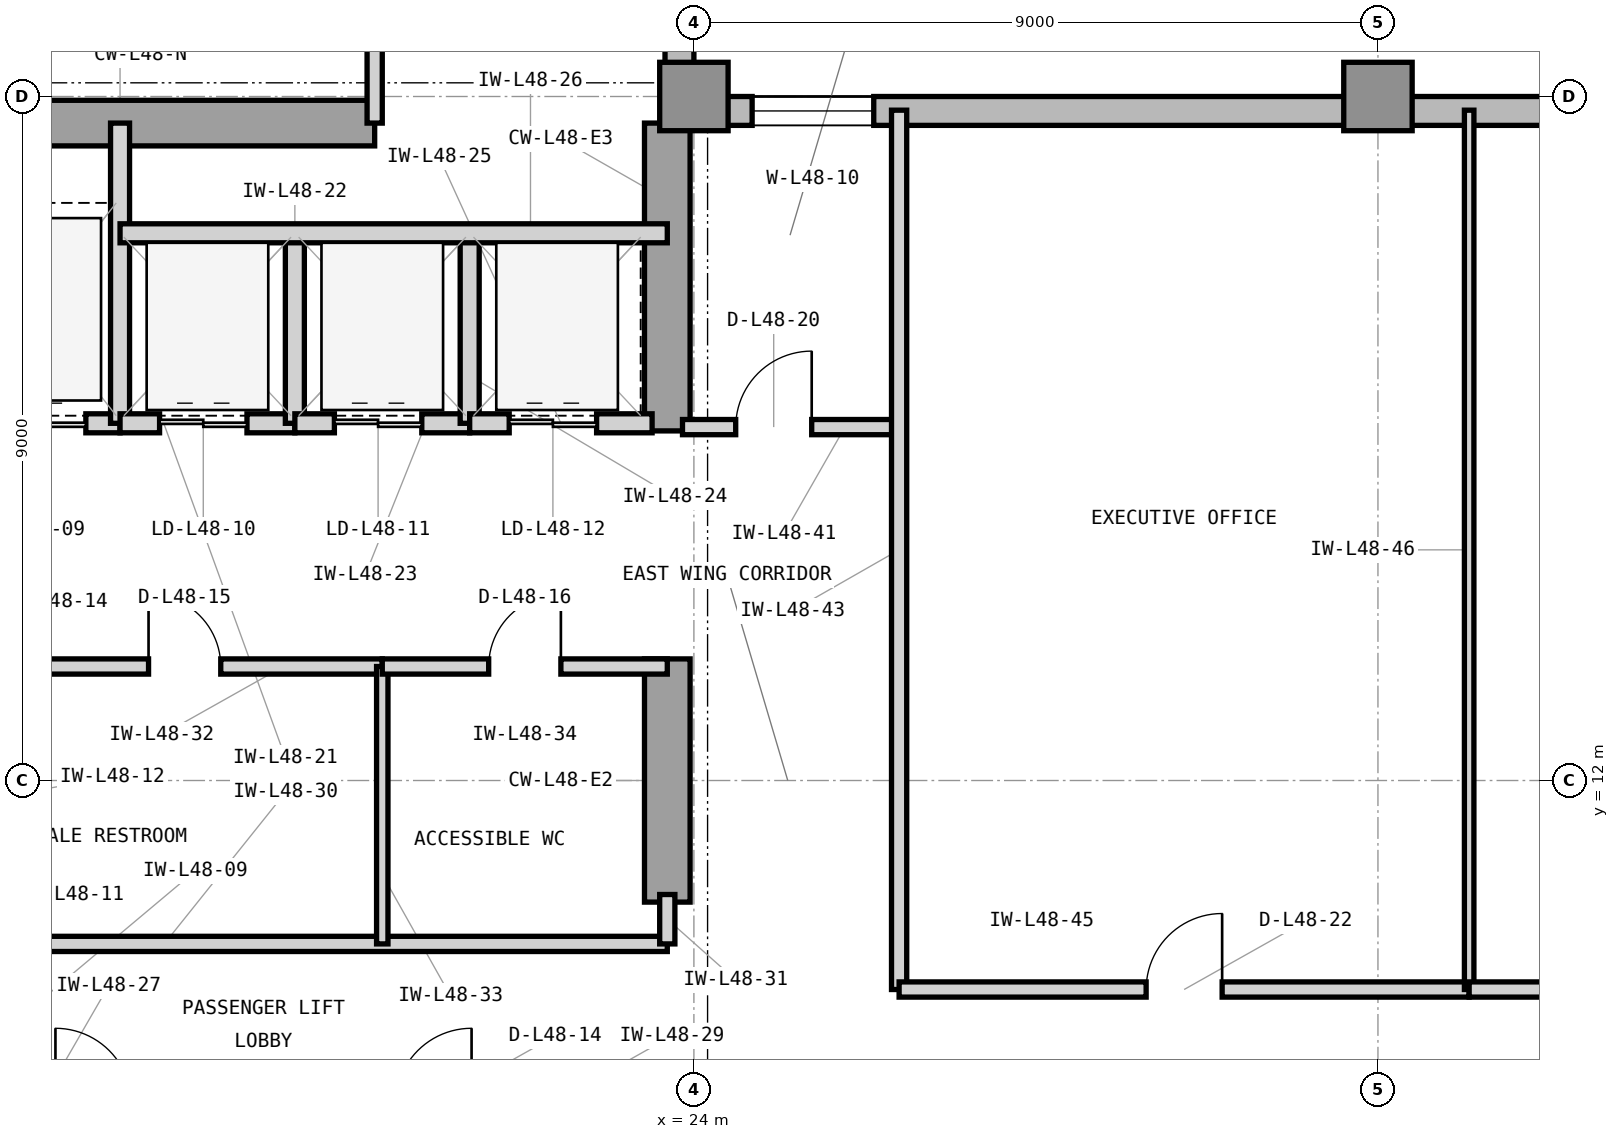
"""IFC4 building model, lengths in metres.
Left out: names, types, materials, properties, quantities, classifications, styles, units other than length and angle.
Written with IfcOpenShell. Run it as: python <this file> out.ifc"""

import sys

from ifc_helpers import new_model, si_unit, direction, frame, frame_2d, origin, origin_2d, place, context, subcontext, project, spatial, rectangle, extrude, element, fill, save


model = new_model("IFC4")
c1 = context("Model", 3, precision=1e-05, world=origin(), true_north=direction((0.0, 1.0)))
c2 = subcontext(c1, "Body", "Model", "MODEL_VIEW")
j1 = project(units=[si_unit("LENGTHUNIT", "METRE"), si_unit("PLANEANGLEUNIT", "RADIAN")], contexts=[c1])
p1 = place(None, origin())
s1 = spatial("IfcSite", under=j1, at=p1, CompositionType="ELEMENT")
p2 = place(p1, origin())
s2 = spatial("IfcBuilding", under=s1, at=p2, CompositionType="ELEMENT")
p3 = place(p2, frame((0.0, 0.0, 199.5)))
s3 = spatial("IfcBuildingStorey", under=s2, at=p3, CompositionType="ELEMENT", Elevation=199.5)
p4 = place(p3, frame((7.475, 20.65, 0.0), z_axis=(0.0, 0.0, 1.0), x_axis=(1.0, 0.0, 0.0)))
e1 = element("IfcWall", 1, at=p4, inside=s3, PredefinedType="SHEAR", context=c2, shape_type="SweptSolid", body=[
    extrude(rectangle(XDim=12.325, YDim=0.6, at=frame_2d((6.163, 0.0))), origin(), (0.0, 0.0, 1.0), 3.9),
])
p5 = place(p3, frame((23.65, 10.4, 0.0), z_axis=(0.0, 0.0, 1.0), x_axis=(0.0, 1.0, 0.0)))
e2 = element("IfcWall", 2, at=p5, inside=s3, PredefinedType="SHEAR", context=c2, shape_type="SweptSolid", body=[
    extrude(rectangle(XDim=3.2, YDim=0.6, at=frame_2d((1.6, 0.0))), origin(), (0.0, 0.0, 1.0), 3.9),
])
p6 = place(p3, frame((23.65, 16.6, 0.0), z_axis=(0.0, 0.0, 1.0), x_axis=(0.0, 1.0, 0.0)))
e3 = element("IfcWall", 3, at=p6, inside=s3, PredefinedType="SHEAR", context=c2, shape_type="SweptSolid", body=[
    extrude(rectangle(XDim=4.05, YDim=0.6, at=frame_2d((2.025, 0.0))), origin(), (0.0, 0.0, 1.0), 3.9),
])
for number, where, z_axis, x_axis in (
    (4, (24.0, 21.0, 0.0), (0.0, 0.0, 1.0), (1.0, 0.0, 0.0)),
    (5, (33.0, 21.0, 0.0), (0.0, 0.0, 1.0), (1.0, 0.0, 0.0)),
):
    element("IfcColumn", number, at=place(p3, frame(where, z_axis=z_axis, x_axis=x_axis)), inside=s3, PredefinedType="COLUMN", context=c2, shape_type="SweptSolid", body=[
        extrude(rectangle(XDim=0.9, YDim=0.9, at=origin_2d()), origin(), (0.0, 0.0, 1.0), 3.9),
    ])
p7 = place(p3, frame((55.4, 20.81, 0.0), z_axis=(0.0, 0.0, 1.0), x_axis=(-1.0, 0.0, 0.0)))
e6 = element("IfcWall", 6, at=p7, inside=s3, PredefinedType="STANDARD", context=c2, shape_type="SweptSolid", body=[
    extrude(rectangle(XDim=31.4, YDim=0.38, at=frame_2d((15.7, 0.0))), origin(), (0.0, 0.0, 1.0), 3.7),
])
p8 = place(p7, frame((17.167, 0.0, 0.9)))
e7 = element("IfcOpeningElement", 7, at=p8, cuts=e6, PredefinedType="OPENING", context=c2, shape_type="SweptSolid", body=[
    extrude(rectangle(XDim=2.3, YDim=2.2, at=frame_2d((1.15, 1.1))), frame((0.0, 0.2, 0.0), z_axis=(0.0, -1.0, 0.0), x_axis=(1.0, 0.0, 0.0)), (0.0, 0.0, 1.0), 0.4),
])
p9 = place(p7, frame((29.034, 0.0, 0.9)))
e8 = element("IfcOpeningElement", 8, at=p9, cuts=e6, PredefinedType="OPENING", context=c2, shape_type="SweptSolid", body=[
    extrude(rectangle(XDim=1.6, YDim=2.2, at=frame_2d((0.8, 1.1))), frame((0.0, 0.2, 0.0), z_axis=(0.0, -1.0, 0.0), x_axis=(1.0, 0.0, 0.0)), (0.0, 0.0, 1.0), 0.4),
])
p10 = place(p7, frame((8.904, 0.0, 0.9)))
e9 = element("IfcOpeningElement", 9, at=p10, cuts=e6, PredefinedType="OPENING", context=c2, shape_type="SweptSolid", body=[
    extrude(rectangle(XDim=2.3, YDim=2.2, at=frame_2d((1.15, 1.1))), frame((0.0, 0.2, 0.0), z_axis=(0.0, -1.0, 0.0), x_axis=(1.0, 0.0, 0.0)), (0.0, 0.0, 1.0), 0.4),
])
p11 = place(p3, frame((23.81, 21.0, 0.0), z_axis=(0.0, 0.0, 1.0), x_axis=(0.0, 1.0, 0.0)))
e10 = element("IfcWall", 10, at=p11, inside=s3, PredefinedType="STANDARD", context=c2, shape_type="SweptSolid", body=[
    extrude(rectangle(XDim=8.55, YDim=0.38, at=frame_2d((4.275, 0.0))), origin(), (0.0, 0.0, 1.0), 3.7),
])
p12 = place(p3, frame((14.15, 16.7, 0.0), z_axis=(0.0, 0.0, 1.0), x_axis=(1.0, 0.0, 0.0)))
e11 = element("IfcWall", 11, at=p12, inside=s3, PredefinedType="PARTITIONING", context=c2, shape_type="SweptSolid", body=[
    extrude(rectangle(XDim=2.3, YDim=0.25, at=frame_2d((1.15, 0.0))), origin(), (0.0, 0.0, 1.0), 3.283),
])
p13 = place(p12, frame((0.45, 0.0, 0.0)))
e12 = element("IfcOpeningElement", 12, at=p13, cuts=e11, PredefinedType="OPENING", context=c2, shape_type="SweptSolid", body=[
    extrude(rectangle(XDim=1.4, YDim=2.35, at=frame_2d((0.7, 1.175))), frame((0.0, 0.135, 0.0), z_axis=(0.0, -1.0, 0.0), x_axis=(1.0, 0.0, 0.0)), (0.0, 0.0, 1.0), 0.27),
])
p14 = place(p3, frame((16.45, 16.7, 0.0), z_axis=(0.0, 0.0, 1.0), x_axis=(0.0, 1.0, 0.0)))
e13 = element("IfcWall", 13, at=p14, inside=s3, PredefinedType="PARTITIONING", context=c2, shape_type="SweptSolid", body=[
    extrude(rectangle(XDim=3.95, YDim=0.25, at=frame_2d((1.975, 0.0))), origin(), (0.0, 0.0, 1.0), 3.69),
])
p15 = place(p3, frame((16.45, 16.7, 0.0), z_axis=(0.0, 0.0, 1.0), x_axis=(1.0, 0.0, 0.0)))
e14 = element("IfcWall", 14, at=p15, inside=s3, PredefinedType="PARTITIONING", context=c2, shape_type="SweptSolid", body=[
    extrude(rectangle(XDim=2.3, YDim=0.25, at=frame_2d((1.15, 0.0))), origin(), (0.0, 0.0, 1.0), 3.283),
])
p16 = place(p15, frame((0.52, 0.0, 0.0)))
e15 = element("IfcOpeningElement", 15, at=p16, cuts=e14, PredefinedType="OPENING", context=c2, shape_type="SweptSolid", body=[
    extrude(rectangle(XDim=1.15, YDim=2.25, at=frame_2d((0.575, 1.125))), frame((0.0, 0.135, 0.0), z_axis=(0.0, -1.0, 0.0), x_axis=(1.0, 0.0, 0.0)), (0.0, 0.0, 1.0), 0.27),
])
p17 = place(p3, frame((18.75, 16.7, 0.0), z_axis=(0.0, 0.0, 1.0), x_axis=(0.0, 1.0, 0.0)))
e16 = element("IfcWall", 16, at=p17, inside=s3, PredefinedType="PARTITIONING", context=c2, shape_type="SweptSolid", body=[
    extrude(rectangle(XDim=2.5, YDim=0.25, at=frame_2d((1.25, 0.0))), origin(), (0.0, 0.0, 1.0), 3.69),
])
p18 = place(p3, frame((18.75, 16.7, 0.0), z_axis=(0.0, 0.0, 1.0), x_axis=(1.0, 0.0, 0.0)))
e17 = element("IfcWall", 17, at=p18, inside=s3, PredefinedType="PARTITIONING", context=c2, shape_type="SweptSolid", body=[
    extrude(rectangle(XDim=2.3, YDim=0.25, at=frame_2d((1.15, 0.0))), origin(), (0.0, 0.0, 1.0), 3.283),
])
p19 = place(p18, frame((0.52, 0.0, 0.0)))
e18 = element("IfcOpeningElement", 18, at=p19, cuts=e17, PredefinedType="OPENING", context=c2, shape_type="SweptSolid", body=[
    extrude(rectangle(XDim=1.15, YDim=2.25, at=frame_2d((0.575, 1.125))), frame((0.0, 0.135, 0.0), z_axis=(0.0, -1.0, 0.0), x_axis=(1.0, 0.0, 0.0)), (0.0, 0.0, 1.0), 0.27),
])
p20 = place(p3, frame((21.05, 16.7, 0.0), z_axis=(0.0, 0.0, 1.0), x_axis=(0.0, 1.0, 0.0)))
e19 = element("IfcWall", 19, at=p20, inside=s3, PredefinedType="PARTITIONING", context=c2, shape_type="SweptSolid", body=[
    extrude(rectangle(XDim=2.5, YDim=0.25, at=frame_2d((1.25, 0.0))), origin(), (0.0, 0.0, 1.0), 3.69),
])
p21 = place(p3, frame((21.05, 16.7, 0.0), z_axis=(0.0, 0.0, 1.0), x_axis=(1.0, 0.0, 0.0)))
e20 = element("IfcWall", 20, at=p21, inside=s3, PredefinedType="PARTITIONING", context=c2, shape_type="SweptSolid", body=[
    extrude(rectangle(XDim=2.4, YDim=0.25, at=frame_2d((1.2, 0.0))), origin(), (0.0, 0.0, 1.0), 3.283),
])
p22 = place(p21, frame((0.52, 0.0, 0.0)))
e21 = element("IfcOpeningElement", 21, at=p22, cuts=e20, PredefinedType="OPENING", context=c2, shape_type="SweptSolid", body=[
    extrude(rectangle(XDim=1.15, YDim=2.25, at=frame_2d((0.575, 1.125))), frame((0.0, 0.135, 0.0), z_axis=(0.0, -1.0, 0.0), x_axis=(1.0, 0.0, 0.0)), (0.0, 0.0, 1.0), 0.27),
])
p23 = place(p3, frame((16.45, 19.2, 0.0), z_axis=(0.0, 0.0, 1.0), x_axis=(1.0, 0.0, 0.0)))
e22 = element("IfcWall", 22, at=p23, inside=s3, PredefinedType="PARTITIONING", context=c2, shape_type="SweptSolid", body=[
    extrude(rectangle(XDim=7.2, YDim=0.25, at=frame_2d((3.6, 0.0))), origin(), (0.0, 0.0, 1.0), 3.69),
])
p24 = place(p3, frame((14.825, 9.85, 0.0), z_axis=(0.0, 0.0, 1.0), x_axis=(1.0, 0.0, 0.0)))
e23 = element("IfcWall", 23, at=p24, inside=s3, PredefinedType="PARTITIONING", context=c2, shape_type="SweptSolid", body=[
    extrude(rectangle(XDim=8.825, YDim=0.2, at=frame_2d((4.413, 0.0))), origin(), (0.0, 0.0, 1.0), 3.69),
])
p25 = place(p3, frame((23.65, 9.85, 0.0), z_axis=(0.0, 0.0, 1.0), x_axis=(0.0, 1.0, 0.0)))
e24 = element("IfcWall", 24, at=p25, inside=s3, PredefinedType="PARTITIONING", context=c2, shape_type="SweptSolid", body=[
    extrude(rectangle(XDim=0.65, YDim=0.2, at=frame_2d((0.325, 0.0))), origin(), (0.0, 0.0, 1.0), 3.69),
])
p26 = place(p3, frame((14.7, 13.5, 0.0), z_axis=(0.0, 0.0, 1.0), x_axis=(1.0, 0.0, 0.0)))
e25 = element("IfcWall", 25, at=p26, inside=s3, PredefinedType="PARTITIONING", context=c2, shape_type="SweptSolid", body=[
    extrude(rectangle(XDim=5.2, YDim=0.2, at=frame_2d((2.6, 0.0))), origin(), (0.0, 0.0, 1.0), 3.283),
])
p27 = place(p26, frame((2.125, 0.0, 0.0)))
e26 = element("IfcOpeningElement", 26, at=p27, cuts=e25, PredefinedType="OPENING", context=c2, shape_type="SweptSolid", body=[
    extrude(rectangle(XDim=0.95, YDim=2.1, at=frame_2d((0.475, 1.05))), frame((0.0, 0.11, 0.0), z_axis=(0.0, -1.0, 0.0), x_axis=(1.0, 0.0, 0.0)), (0.0, 0.0, 1.0), 0.22),
])
p28 = place(p3, frame((19.9, 9.85, 0.0), z_axis=(0.0, 0.0, 1.0), x_axis=(0.0, 1.0, 0.0)))
e27 = element("IfcWall", 27, at=p28, inside=s3, PredefinedType="PARTITIONING", context=c2, shape_type="SweptSolid", body=[
    extrude(rectangle(XDim=3.65, YDim=0.15, at=frame_2d((1.825, 0.0))), origin(), (0.0, 0.0, 1.0), 3.69),
])
p29 = place(p3, frame((19.9, 13.5, 0.0), z_axis=(0.0, 0.0, 1.0), x_axis=(1.0, 0.0, 0.0)))
e28 = element("IfcWall", 28, at=p29, inside=s3, PredefinedType="PARTITIONING", context=c2, shape_type="SweptSolid", body=[
    extrude(rectangle(XDim=3.75, YDim=0.2, at=frame_2d((1.875, 0.0))), origin(), (0.0, 0.0, 1.0), 3.283),
])
p30 = place(p29, frame((1.4, 0.0, 0.0)))
e29 = element("IfcOpeningElement", 29, at=p30, cuts=e28, PredefinedType="OPENING", context=c2, shape_type="SweptSolid", body=[
    extrude(rectangle(XDim=0.95, YDim=2.1, at=frame_2d((0.475, 1.05))), frame((0.0, 0.11, 0.0), z_axis=(0.0, -1.0, 0.0), x_axis=(1.0, 0.0, 0.0)), (0.0, 0.0, 1.0), 0.22),
])
p31 = place(p3, frame((23.85, 16.65, 0.0), z_axis=(0.0, 0.0, 1.0), x_axis=(1.0, 0.0, 0.0)))
e30 = element("IfcWall", 30, at=p31, inside=s3, PredefinedType="PARTITIONING", context=c2, shape_type="SweptSolid", body=[
    extrude(rectangle(XDim=2.85, YDim=0.2, at=frame_2d((1.425, 0.0))), origin(), (0.0, 0.0, 1.0), 3.69),
])
p32 = place(p31, frame((0.7, 0.0, 0.0)))
e31 = element("IfcOpeningElement", 31, at=p32, cuts=e30, PredefinedType="OPENING", context=c2, shape_type="SweptSolid", body=[
    extrude(rectangle(XDim=1.0, YDim=2.15, at=frame_2d((0.5, 1.075))), frame((0.0, 0.11, 0.0), z_axis=(0.0, -1.0, 0.0), x_axis=(1.0, 0.0, 0.0)), (0.0, 0.0, 1.0), 0.22),
])
p33 = place(p3, frame((26.7, 9.25, 0.0), z_axis=(0.0, 0.0, 1.0), x_axis=(0.0, 1.0, 0.0)))
e32 = element("IfcWall", 32, at=p33, inside=s3, PredefinedType="PARTITIONING", context=c2, shape_type="SweptSolid", body=[
    extrude(rectangle(XDim=11.57, YDim=0.2, at=frame_2d((5.785, 0.0))), origin(), (0.0, 0.0, 1.0), 3.69),
])
p34 = place(p3, frame((26.7, 9.25, 0.0), z_axis=(0.0, 0.0, 1.0), x_axis=(1.0, 0.0, 0.0)))
e33 = element("IfcWall", 33, at=p34, inside=s3, PredefinedType="PARTITIONING", context=c2, shape_type="SweptSolid", body=[
    extrude(rectangle(XDim=7.5, YDim=0.2, at=frame_2d((3.75, 0.0))), origin(), (0.0, 0.0, 1.0), 3.69),
])
p35 = place(p34, frame((3.25, 0.0, 0.0)))
e34 = element("IfcOpeningElement", 34, at=p35, cuts=e33, PredefinedType="OPENING", context=c2, shape_type="SweptSolid", body=[
    extrude(rectangle(XDim=1.0, YDim=2.15, at=frame_2d((0.5, 1.075))), frame((0.0, 0.11, 0.0), z_axis=(0.0, -1.0, 0.0), x_axis=(1.0, 0.0, 0.0)), (0.0, 0.0, 1.0), 0.22),
])
p36 = place(p3, frame((34.2, 9.25, 0.0), z_axis=(0.0, 0.0, 1.0), x_axis=(0.0, 1.0, 0.0)))
e35 = element("IfcWall", 35, at=p36, inside=s3, PredefinedType="PARTITIONING", context=c2, shape_type="SweptSolid", body=[
    extrude(rectangle(XDim=11.57, YDim=0.125, at=frame_2d((5.785, 0.0))), origin(), (0.0, 0.0, 1.0), 3.69),
])
p37 = place(p3, frame((34.2, 9.25, 0.0), z_axis=(0.0, 0.0, 1.0), x_axis=(1.0, 0.0, 0.0)))
e36 = element("IfcWall", 36, at=p37, inside=s3, PredefinedType="PARTITIONING", context=c2, shape_type="SweptSolid", body=[
    extrude(rectangle(XDim=7.5, YDim=0.2, at=frame_2d((3.75, 0.0))), origin(), (0.0, 0.0, 1.0), 3.69),
])
p38 = place(p37, frame((3.25, 0.0, 0.0)))
e37 = element("IfcOpeningElement", 37, at=p38, cuts=e36, PredefinedType="OPENING", context=c2, shape_type="SweptSolid", body=[
    extrude(rectangle(XDim=1.0, YDim=2.15, at=frame_2d((0.5, 1.075))), frame((0.0, 0.11, 0.0), z_axis=(0.0, -1.0, 0.0), x_axis=(1.0, 0.0, 0.0)), (0.0, 0.0, 1.0), 0.22),
])
p39 = place(p3, frame((19.8, 20.65, 0.0), z_axis=(0.0, 0.0, 1.0), x_axis=(0.0, 1.0, 0.0)))
e38 = element("IfcWall", 38, at=p39, inside=s3, PredefinedType="PARTITIONING", context=c2, shape_type="SweptSolid", body=[
    extrude(rectangle(XDim=6.15, YDim=0.2, at=frame_2d((3.075, 0.0))), origin(), (0.0, 0.0, 1.0), 3.69),
])
p40 = place(p13, origin())
e39 = element("IfcDoor", 39, at=p40, inside=s3, OperationType="DOUBLE_DOOR_SLIDING", PredefinedType="DOOR", context=c2, shape_type="SweptSolid", body=[
    extrude(rectangle(XDim=1.4, YDim=2.35, at=frame_2d((0.7, 1.175))), frame((0.0, 0.025, 0.0), z_axis=(0.0, -1.0, 0.0), x_axis=(1.0, 0.0, 0.0)), (0.0, 0.0, 1.0), 0.05),
])
fill(e12, e39)
p41 = place(p16, origin())
e40 = element("IfcDoor", 40, at=p41, inside=s3, OperationType="DOUBLE_DOOR_SLIDING", PredefinedType="DOOR", context=c2, shape_type="SweptSolid", body=[
    extrude(rectangle(XDim=1.15, YDim=2.25, at=frame_2d((0.575, 1.125))), frame((0.0, 0.025, 0.0), z_axis=(0.0, -1.0, 0.0), x_axis=(1.0, 0.0, 0.0)), (0.0, 0.0, 1.0), 0.05),
])
fill(e15, e40)
p42 = place(p19, origin())
e41 = element("IfcDoor", 41, at=p42, inside=s3, OperationType="DOUBLE_DOOR_SLIDING", PredefinedType="DOOR", context=c2, shape_type="SweptSolid", body=[
    extrude(rectangle(XDim=1.15, YDim=2.25, at=frame_2d((0.575, 1.125))), frame((0.0, 0.025, 0.0), z_axis=(0.0, -1.0, 0.0), x_axis=(1.0, 0.0, 0.0)), (0.0, 0.0, 1.0), 0.05),
])
fill(e18, e41)
p43 = place(p22, origin())
e42 = element("IfcDoor", 42, at=p43, inside=s3, OperationType="DOUBLE_DOOR_SLIDING", PredefinedType="DOOR", context=c2, shape_type="SweptSolid", body=[
    extrude(rectangle(XDim=1.15, YDim=2.25, at=frame_2d((0.575, 1.125))), frame((0.0, 0.025, 0.0), z_axis=(0.0, -1.0, 0.0), x_axis=(1.0, 0.0, 0.0)), (0.0, 0.0, 1.0), 0.05),
])
fill(e21, e42)
p44 = place(p27, origin())
e43 = element("IfcDoor", 43, at=p44, inside=s3, OperationType="SINGLE_SWING_LEFT", PredefinedType="DOOR", context=c2, shape_type="SweptSolid", body=[
    extrude(rectangle(XDim=0.95, YDim=2.1, at=frame_2d((0.475, 1.05))), frame((0.0, 0.025, 0.0), z_axis=(0.0, -1.0, 0.0), x_axis=(1.0, 0.0, 0.0)), (0.0, 0.0, 1.0), 0.05),
])
fill(e26, e43)
p45 = place(p30, origin())
e44 = element("IfcDoor", 44, at=p45, inside=s3, OperationType="SINGLE_SWING_RIGHT", PredefinedType="DOOR", context=c2, shape_type="SweptSolid", body=[
    extrude(rectangle(XDim=0.95, YDim=2.1, at=frame_2d((0.475, 1.05))), frame((0.0, 0.025, 0.0), z_axis=(0.0, -1.0, 0.0), x_axis=(1.0, 0.0, 0.0)), (0.0, 0.0, 1.0), 0.05),
])
fill(e29, e44)
p46 = place(p32, origin())
e45 = element("IfcDoor", 45, at=p46, inside=s3, OperationType="SINGLE_SWING_RIGHT", PredefinedType="DOOR", context=c2, shape_type="SweptSolid", body=[
    extrude(rectangle(XDim=1.0, YDim=2.15, at=frame_2d((0.5, 1.075))), frame((0.0, 0.025, 0.0), z_axis=(0.0, -1.0, 0.0), x_axis=(1.0, 0.0, 0.0)), (0.0, 0.0, 1.0), 0.05),
])
fill(e31, e45)
p47 = place(p35, origin())
e46 = element("IfcDoor", 46, at=p47, inside=s3, OperationType="SINGLE_SWING_RIGHT", PredefinedType="DOOR", context=c2, shape_type="SweptSolid", body=[
    extrude(rectangle(XDim=1.0, YDim=2.15, at=frame_2d((0.5, 1.075))), frame((0.0, 0.025, 0.0), z_axis=(0.0, -1.0, 0.0), x_axis=(1.0, 0.0, 0.0)), (0.0, 0.0, 1.0), 0.05),
])
fill(e34, e46)
p48 = place(p9, origin())
e47 = element("IfcWindow", 47, at=p48, inside=s3, PartitioningType="SINGLE_PANEL", PredefinedType="WINDOW", context=c2, shape_type="SweptSolid", body=[
    extrude(rectangle(XDim=1.6, YDim=2.2, at=frame_2d((0.8, 1.1))), frame((0.0, 0.11, 0.0), z_axis=(0.0, -1.0, 0.0), x_axis=(1.0, 0.0, 0.0)), (0.0, 0.0, 1.0), 0.06),
])
fill(e8, e47)
save(model, sys.argv[1])
